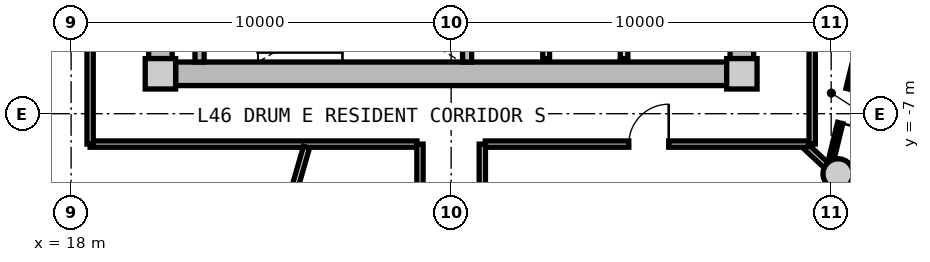
"""IFC4 building model, lengths in metres.
Left out: names, types, materials, properties, quantities, classifications, styles, units other than length and angle.
Written with IfcOpenShell. Run it as: python <this file> out.ifc"""

import sys

from ifc_helpers import new_model, si_unit, direction, frame, frame_2d, origin, origin_2d, place, context, subcontext, project, spatial, rectangle, circle, extrude, source, transform, mapped, element, fill, save


model = new_model("IFC4")
c1 = context("Model", 3, precision=1e-05, world=origin(), true_north=direction((0.0, 1.0)))
c2 = subcontext(c1, "Body", "Model", "MODEL_VIEW")
j1 = project(units=[si_unit("LENGTHUNIT", "METRE"), si_unit("PLANEANGLEUNIT", "RADIAN")], contexts=[c1])
p1 = place(None, origin())
s1 = spatial("IfcSite", under=j1, at=p1, CompositionType="ELEMENT")
p2 = place(p1, origin())
s2 = spatial("IfcBuilding", under=s1, at=p2, CompositionType="ELEMENT")
p3 = place(p2, frame((0.0, 0.0, 149.55)))
s3 = spatial("IfcBuildingStorey", under=s2, at=p3, CompositionType="ELEMENT", Elevation=149.55)
m1 = source(origin(), c2, "Body", "SweptSolid", [
    extrude(rectangle(XDim=0.8, YDim=0.8, at=origin_2d()), origin(), (0.0, 0.0, 1.0), 3.05),
])
for number, where, z_axis, x_axis in (
    (1, (20.35, -5.95, 0.0), (0.0, 0.0, 1.0), (1.0, 0.0, 0.0)),
    (2, (35.65, -5.95, 0.0), (0.0, 0.0, 1.0), (1.0, 0.0, 0.0)),
):
    element("IfcColumn", number, at=place(p3, frame(where, z_axis=z_axis, x_axis=x_axis)), inside=s3, PredefinedType="COLUMN", context=c2, shape_type="MappedRepresentation", body=[
        mapped(m1, transform((0.0, 0.0, 0.0), x_axis=(1.0, 0.0, 0.0), y_axis=(0.0, 1.0, 0.0), z_axis=(0.0, 0.0, 1.0), scale=1.0)),
    ])
m2 = source(origin(), c2, "Body", "SweptSolid", [
    extrude(rectangle(XDim=14.5, YDim=0.62, at=frame_2d((7.25, 0.0))), origin(), (0.0, 0.0, 1.0), 2.81),
])
p4 = place(p3, frame((35.25, -5.95, 0.0), z_axis=(0.0, 0.0, 1.0), x_axis=(-1.0, 0.0, 0.0)))
e3 = element("IfcWall", 3, at=p4, inside=s3, PredefinedType="SHEAR", context=c2, shape_type="MappedRepresentation", body=[
    mapped(m2, transform((0.0, 0.0, 0.0), x_axis=(1.0, 0.0, 0.0), y_axis=(0.0, 1.0, 0.0), z_axis=(0.0, 0.0, 1.0), scale=1.0)),
])
m3 = source(origin(), c2, "Body", "SweptSolid", [
    extrude(rectangle(XDim=11.1, YDim=0.62, at=frame_2d((5.55, 0.0))), origin(), (0.0, 0.0, 1.0), 2.81),
])
p5 = place(p3, frame((20.35, -5.55, 0.0), z_axis=(0.0, 0.0, 1.0), x_axis=(0.0, 1.0, 0.0)))
e4 = element("IfcWall", 4, at=p5, inside=s3, PredefinedType="SHEAR", context=c2, shape_type="MappedRepresentation", body=[
    mapped(m3, transform((0.0, 0.0, 0.0), x_axis=(1.0, 0.0, 0.0), y_axis=(0.0, 1.0, 0.0), z_axis=(0.0, 0.0, 1.0), scale=1.0)),
])
p6 = place(p5, frame((3.8, 0.0, 0.0)))
e5 = element("IfcOpeningElement", 5, at=p6, cuts=e4, PredefinedType="OPENING", context=c2, shape_type="SweptSolid", body=[
    extrude(rectangle(XDim=1.2, YDim=2.15, at=frame_2d((0.6, 1.075))), frame((0.0, 0.32, 0.0), z_axis=(0.0, -1.0, 0.0), x_axis=(1.0, 0.0, 0.0)), (0.0, 0.0, 1.0), 0.64),
])
p7 = place(p3, frame((35.65, 5.55, 0.0), z_axis=(0.0, 0.0, 1.0), x_axis=(0.0, -1.0, 0.0)))
e6 = element("IfcWall", 6, at=p7, inside=s3, PredefinedType="SHEAR", context=c2, shape_type="MappedRepresentation", body=[
    mapped(m3, transform((0.0, 0.0, 0.0), x_axis=(1.0, 0.0, 0.0), y_axis=(0.0, 1.0, 0.0), z_axis=(0.0, 0.0, 1.0), scale=1.0)),
])
p8 = place(p7, frame((5.65, 0.0, 0.0)))
e7 = element("IfcOpeningElement", 7, at=p8, cuts=e6, PredefinedType="OPENING", context=c2, shape_type="SweptSolid", body=[
    extrude(rectangle(XDim=1.2, YDim=2.15, at=frame_2d((0.6, 1.075))), frame((0.0, 0.32, 0.0), z_axis=(0.0, -1.0, 0.0), x_axis=(1.0, 0.0, 0.0)), (0.0, 0.0, 1.0), 0.64),
])
p9 = place(p7, frame((9.3, 0.0, 0.0)))
e8 = element("IfcOpeningElement", 8, at=p9, cuts=e6, PredefinedType="OPENING", context=c2, shape_type="SweptSolid", body=[
    extrude(rectangle(XDim=1.0, YDim=2.1, at=frame_2d((0.5, 1.05))), frame((0.0, 0.32, 0.0), z_axis=(0.0, -1.0, 0.0), x_axis=(1.0, 0.0, 0.0)), (0.0, 0.0, 1.0), 0.64),
])
m4 = source(origin(), c2, "Body", "SweptSolid", [
    extrude(circle(Radius=0.4, at=origin_2d()), origin(), (0.0, 0.0, 1.0), 3.05),
])
p10 = place(p3, frame((38.183, -8.584, 0.0), z_axis=(0.0, 0.0, 1.0), x_axis=(1.0, 0.0, 0.0)))
e9 = element("IfcColumn", 9, at=p10, inside=s3, PredefinedType="COLUMN", context=c2, shape_type="MappedRepresentation", body=[
    mapped(m4, transform((0.0, 0.0, 0.0), x_axis=(1.0, 0.0, 0.0), y_axis=(0.0, 1.0, 0.0), z_axis=(0.0, 0.0, 1.0), scale=1.0)),
])
m5 = source(origin(), c2, "Body", "SweptSolid", [
    extrude(rectangle(XDim=3.19, YDim=0.24, at=frame_2d((1.595, 0.0))), origin(), (0.0, 0.0, 1.0), 2.81),
])
for number, where, z_axis, x_axis in (
    (10, (21.38, -5.64, 0.0), (0.0, 0.0, 1.0), (0.0, 1.0, 0.0)),
    (11, (28.42, -5.64, 0.0), (0.0, 0.0, 1.0), (0.0, 1.0, 0.0)),
):
    element("IfcWall", number, at=place(p3, frame(where, z_axis=z_axis, x_axis=x_axis)), inside=s3, PredefinedType="PARTITIONING", context=c2, shape_type="MappedRepresentation", body=[
        mapped(m5, transform((0.0, 0.0, 0.0), x_axis=(1.0, 0.0, 0.0), y_axis=(0.0, 1.0, 0.0), z_axis=(0.0, 0.0, 1.0), scale=1.0)),
    ])
m6 = source(origin(), c2, "Body", "SweptSolid", [
    extrude(rectangle(XDim=3.8, YDim=0.2, at=frame_2d((1.9, 0.0))), origin(), (0.0, 0.0, 1.0), 2.795),
])
p11 = place(p3, frame((32.55, -5.55, 0.0), z_axis=(0.0, 0.0, 1.0), x_axis=(0.0, 1.0, 0.0)))
e12 = element("IfcWall", 12, at=p11, inside=s3, PredefinedType="PARTITIONING", context=c2, shape_type="MappedRepresentation", body=[
    mapped(m6, transform((0.0, 0.0, 0.0), x_axis=(1.0, 0.0, 0.0), y_axis=(0.0, 1.0, 0.0), z_axis=(0.0, 0.0, 1.0), scale=1.0)),
])
m7 = source(origin(), c2, "Body", "SweptSolid", [
    extrude(rectangle(XDim=3.22, YDim=0.18, at=frame_2d((1.61, 0.0))), origin(), (0.0, 0.0, 1.0), 2.795),
])
p12 = place(p3, frame((30.5, -5.55, 0.0), z_axis=(0.0, 0.0, 1.0), x_axis=(0.0, 1.0, 0.0)))
e13 = element("IfcWall", 13, at=p12, inside=s3, PredefinedType="PARTITIONING", context=c2, shape_type="MappedRepresentation", body=[
    mapped(m7, transform((0.0, 0.0, 0.0), x_axis=(1.0, 0.0, 0.0), y_axis=(0.0, 1.0, 0.0), z_axis=(0.0, 0.0, 1.0), scale=1.0)),
])
m8 = source(origin(), c2, "Body", "SweptSolid", [
    extrude(rectangle(XDim=8.6, YDim=0.165, at=frame_2d((4.3, 0.0))), origin(), (0.0, 0.0, 1.0), 2.795),
])
p13 = place(p3, frame((37.5, -7.8, 0.0), z_axis=(0.0, 0.0, 1.0), x_axis=(-1.0, 0.0, 0.0)))
e14 = element("IfcWall", 14, at=p13, inside=s3, PredefinedType="PARTITIONING", context=c2, shape_type="MappedRepresentation", body=[
    mapped(m8, transform((0.0, 0.0, 0.0), x_axis=(1.0, 0.0, 0.0), y_axis=(0.0, 1.0, 0.0), z_axis=(0.0, 0.0, 1.0), scale=1.0)),
])
p14 = place(p13, frame((3.775, 0.0, 0.0)))
e15 = element("IfcOpeningElement", 15, at=p14, cuts=e14, PredefinedType="OPENING", context=c2, shape_type="SweptSolid", body=[
    extrude(rectangle(XDim=1.05, YDim=2.15, at=frame_2d((0.525, 1.075))), frame((0.0, 0.093, 0.0), z_axis=(0.0, -1.0, 0.0), x_axis=(1.0, 0.0, 0.0)), (0.0, 0.0, 1.0), 0.185),
])
p15 = place(p3, frame((27.1, -7.8, 0.0), z_axis=(0.0, 0.0, 1.0), x_axis=(-1.0, 0.0, 0.0)))
e16 = element("IfcWall", 16, at=p15, inside=s3, PredefinedType="PARTITIONING", context=c2, shape_type="MappedRepresentation", body=[
    mapped(m8, transform((0.0, 0.0, 0.0), x_axis=(1.0, 0.0, 0.0), y_axis=(0.0, 1.0, 0.0), z_axis=(0.0, 0.0, 1.0), scale=1.0)),
])
m9 = source(origin(), c2, "Body", "SweptSolid", [
    extrude(rectangle(XDim=15.6, YDim=0.165, at=frame_2d((7.8, 0.0))), origin(), (0.0, 0.0, 1.0), 2.795),
])
p16 = place(p3, frame((18.5, -7.8, 0.0), z_axis=(0.0, 0.0, 1.0), x_axis=(0.0, 1.0, 0.0)))
e17 = element("IfcWall", 17, at=p16, inside=s3, PredefinedType="PARTITIONING", context=c2, shape_type="MappedRepresentation", body=[
    mapped(m9, transform((0.0, 0.0, 0.0), x_axis=(1.0, 0.0, 0.0), y_axis=(0.0, 1.0, 0.0), z_axis=(0.0, 0.0, 1.0), scale=1.0)),
])
p17 = place(p16, frame((7.175, 0.0, 0.0)))
e18 = element("IfcOpeningElement", 18, at=p17, cuts=e17, PredefinedType="OPENING", context=c2, shape_type="SweptSolid", body=[
    extrude(rectangle(XDim=1.25, YDim=2.2, at=frame_2d((0.625, 1.1))), frame((0.0, 0.093, 0.0), z_axis=(0.0, -1.0, 0.0), x_axis=(1.0, 0.0, 0.0)), (0.0, 0.0, 1.0), 0.185),
])
p18 = place(p3, frame((37.5, 7.8, 0.0), z_axis=(0.0, 0.0, 1.0), x_axis=(0.0, -1.0, 0.0)))
e19 = element("IfcWall", 19, at=p18, inside=s3, PredefinedType="PARTITIONING", context=c2, shape_type="MappedRepresentation", body=[
    mapped(m9, transform((0.0, 0.0, 0.0), x_axis=(1.0, 0.0, 0.0), y_axis=(0.0, 1.0, 0.0), z_axis=(0.0, 0.0, 1.0), scale=1.0)),
])
p19 = place(p18, frame((5.687, 0.0, 0.0)))
e20 = element("IfcOpeningElement", 20, at=p19, cuts=e19, PredefinedType="OPENING", context=c2, shape_type="SweptSolid", body=[
    extrude(rectangle(XDim=1.05, YDim=2.15, at=frame_2d((0.525, 1.075))), frame((0.0, 0.093, 0.0), z_axis=(0.0, -1.0, 0.0), x_axis=(1.0, 0.0, 0.0)), (0.0, 0.0, 1.0), 0.185),
])
m10 = source(origin(), c2, "Body", "SweptSolid", [
    extrude(rectangle(XDim=6.035, YDim=0.165, at=frame_2d((3.018, 0.0))), origin(), (0.0, 0.0, 1.0), 2.345),
])
p20 = place(p3, frame((24.194, -7.88, 0.0), z_axis=(0.0, 0.0, 1.0), x_axis=(-0.276809454862, -0.960924828329, 0.0)))
e21 = element("IfcWall", 21, at=p20, inside=s3, PredefinedType="PARTITIONING", context=c2, shape_type="MappedRepresentation", body=[
    mapped(m10, transform((0.0, 0.0, 0.0), x_axis=(1.0, 0.0, 0.0), y_axis=(0.0, 1.0, 0.0), z_axis=(0.0, 0.0, 1.0), scale=1.0)),
])
m11 = source(origin(), c2, "Body", "SweptSolid", [
    extrude(rectangle(XDim=2.435, YDim=0.165, at=frame_2d((1.217, 0.0))), origin(), (0.0, 0.0, 1.0), 2.345),
])
p21 = place(p3, frame((37.354, -7.88, 0.0), z_axis=(0.0, 0.0, 1.0), x_axis=(0.732164643118, -0.681127693878, 0.0)))
e22 = element("IfcWall", 22, at=p21, inside=s3, PredefinedType="PARTITIONING", context=c2, shape_type="MappedRepresentation", body=[
    mapped(m11, transform((0.0, 0.0, 0.0), x_axis=(1.0, 0.0, 0.0), y_axis=(0.0, 1.0, 0.0), z_axis=(0.0, 0.0, 1.0), scale=1.0)),
])
m12 = source(origin(), c2, "Body", "SweptSolid", [
    extrude(rectangle(XDim=4.685, YDim=0.165, at=frame_2d((2.342, 0.0))), origin(), (0.0, 0.0, 1.0), 2.795),
])
p22 = place(p3, frame((27.18, -12.485, 0.0), z_axis=(0.0, 0.0, 1.0), x_axis=(0.0, 1.0, 0.0)))
e23 = element("IfcWall", 23, at=p22, inside=s3, PredefinedType="PARTITIONING", context=c2, shape_type="MappedRepresentation", body=[
    mapped(m12, transform((0.0, 0.0, 0.0), x_axis=(1.0, 0.0, 0.0), y_axis=(0.0, 1.0, 0.0), z_axis=(0.0, 0.0, 1.0), scale=1.0)),
])
p23 = place(p22, frame((1.817, 0.0, 0.0)))
e24 = element("IfcOpeningElement", 24, at=p23, cuts=e23, PredefinedType="OPENING", context=c2, shape_type="SweptSolid", body=[
    extrude(rectangle(XDim=1.05, YDim=2.15, at=frame_2d((0.525, 1.075))), frame((0.0, 0.093, 0.0), z_axis=(0.0, -1.0, 0.0), x_axis=(1.0, 0.0, 0.0)), (0.0, 0.0, 1.0), 0.185),
])
p24 = place(p3, frame((28.82, -12.485, 0.0), z_axis=(0.0, 0.0, 1.0), x_axis=(0.0, 1.0, 0.0)))
e25 = element("IfcWall", 25, at=p24, inside=s3, PredefinedType="PARTITIONING", context=c2, shape_type="MappedRepresentation", body=[
    mapped(m12, transform((0.0, 0.0, 0.0), x_axis=(1.0, 0.0, 0.0), y_axis=(0.0, 1.0, 0.0), z_axis=(0.0, 0.0, 1.0), scale=1.0)),
])
m13 = source(origin(), c2, "Body", "SweptSolid", [
    extrude(rectangle(XDim=3.464, YDim=0.14, at=frame_2d((1.732, 0.0))), origin(), (0.0, 0.0, 1.0), 2.795),
])
p25 = place(p3, frame((38.76, -5.115, 0.0), z_axis=(0.0, 0.0, 1.0), x_axis=(-0.238055968485, -0.971251438027, 0.0)))
e26 = element("IfcWall", 26, at=p25, inside=s3, PredefinedType="PARTITIONING", context=c2, shape_type="MappedRepresentation", body=[
    mapped(m13, transform((0.0, 0.0, 0.0), x_axis=(1.0, 0.0, 0.0), y_axis=(0.0, 1.0, 0.0), z_axis=(0.0, 0.0, 1.0), scale=1.0)),
])
p26 = place(p25, frame((1.272, 0.0, 0.0)))
e27 = element("IfcOpeningElement", 27, at=p26, cuts=e26, PredefinedType="OPENING", context=c2, shape_type="SweptSolid", body=[
    extrude(rectangle(XDim=0.92, YDim=2.1, at=frame_2d((0.46, 1.05))), frame((0.0, 0.08, 0.0), z_axis=(0.0, -1.0, 0.0), x_axis=(1.0, 0.0, 0.0)), (0.0, 0.0, 1.0), 0.16),
])
m14 = source(origin(), c2, "Body", "SweptSolid", [
    extrude(rectangle(XDim=1.05, YDim=2.15, at=frame_2d((0.525, 1.075))), frame((0.0, 0.025, 0.0), z_axis=(0.0, -1.0, 0.0), x_axis=(1.0, 0.0, 0.0)), (0.0, 0.0, 1.0), 0.05),
])
p27 = place(p14, frame((1.05, 0.0, 0.0), z_axis=(0.0, 0.0, 1.0), x_axis=(-1.0, 0.0, 0.0)))
e28 = element("IfcDoor", 28, at=p27, inside=s3, OperationType="SINGLE_SWING_RIGHT", PredefinedType="DOOR", context=c2, shape_type="MappedRepresentation", body=[
    mapped(m14, transform((0.0, 0.0, 0.0), x_axis=(1.0, 0.0, 0.0), y_axis=(0.0, 1.0, 0.0), z_axis=(0.0, 0.0, 1.0), scale=1.0)),
])
fill(e15, e28)
m15 = source(origin(), c2, "Body", "SweptSolid", [
    extrude(rectangle(XDim=0.92, YDim=2.1, at=frame_2d((0.46, 1.05))), frame((0.0, 0.025, 0.0), z_axis=(0.0, -1.0, 0.0), x_axis=(1.0, 0.0, 0.0)), (0.0, 0.0, 1.0), 0.05),
])
p28 = place(p26, origin())
e29 = element("IfcDoor", 29, at=p28, inside=s3, OperationType="SINGLE_SWING_RIGHT", PredefinedType="DOOR", context=c2, shape_type="MappedRepresentation", body=[
    mapped(m15, transform((0.0, 0.0, 0.0), x_axis=(1.0, 0.0, 0.0), y_axis=(0.0, 1.0, 0.0), z_axis=(0.0, 0.0, 1.0), scale=1.0)),
])
fill(e27, e29)
save(model, sys.argv[1])
